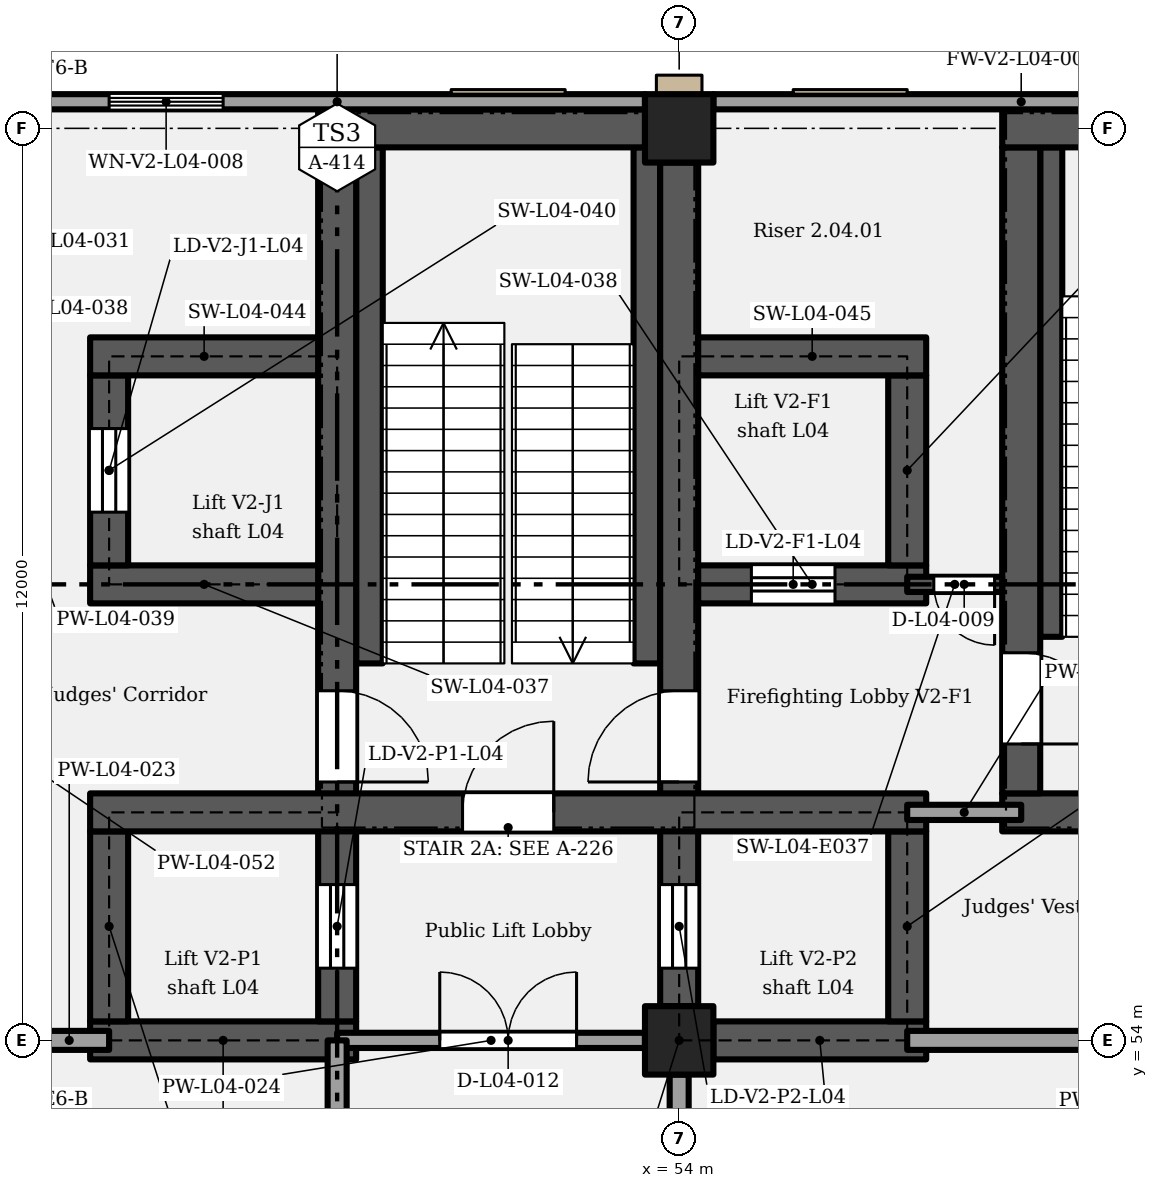
"""IFC4 building model, lengths in metres.
Left out: names, types, materials, properties, quantities, classifications, styles, units other than length and angle.
Written with IfcOpenShell. Run it as: python <this file> out.ifc"""

import sys

from ifc_helpers import new_model, si_unit, direction, frame, frame_2d, origin, origin_2d, place, context, subcontext, project, spatial, rectangle, extrude, element, fill, save


model = new_model("IFC4")
c1 = context("Model", 3, precision=1e-05, world=origin(), true_north=direction((0.0, 1.0)))
c2 = subcontext(c1, "Body", "Model", "MODEL_VIEW")
j1 = project(units=[si_unit("LENGTHUNIT", "METRE"), si_unit("PLANEANGLEUNIT", "RADIAN")], contexts=[c1])
p1 = place(None, origin())
s1 = spatial("IfcSite", under=j1, at=p1, CompositionType="ELEMENT")
p2 = place(p1, origin())
s2 = spatial("IfcBuilding", under=s1, at=p2, CompositionType="ELEMENT")
p3 = place(p2, frame((0.0, 0.0, 22.8)))
s3 = spatial("IfcBuildingStorey", under=s2, at=p3, CompositionType="ELEMENT", Elevation=22.8)
for number, where, z_axis, x_axis in (
    (1, (54.0, 54.0, 0.0), (0.0, 0.0, 1.0), (1.0, 0.0, 0.0)),
    (2, (54.0, 66.0, 0.0), (0.0, 0.0, 1.0), (1.0, 0.0, 0.0)),
):
    element("IfcColumn", number, at=place(p3, frame(where, z_axis=z_axis, x_axis=x_axis)), inside=s3, PredefinedType="COLUMN", context=c2, shape_type="SweptSolid", body=[
        extrude(rectangle(XDim=0.9, YDim=0.9, at=origin_2d()), origin(), (0.0, 0.0, 1.0), 5.4),
    ])
p4 = place(p3, frame((46.25, 54.0, 0.0), z_axis=(0.0, 0.0, 1.0), x_axis=(1.0, 0.0, 0.0)))
e3 = element("IfcWall", 3, at=p4, inside=s3, PredefinedType="SHEAR", context=c2, shape_type="SweptSolid", body=[
    extrude(rectangle(XDim=3.5, YDim=0.5, at=frame_2d((1.75, 0.0))), origin(), (0.0, 0.0, 1.0), 5.15),
])
p5 = place(p3, frame((54.45, 54.0, 0.0), z_axis=(0.0, 0.0, 1.0), x_axis=(1.0, 0.0, 0.0)))
e4 = element("IfcWall", 4, at=p5, inside=s3, PredefinedType="SHEAR", context=c2, shape_type="SweptSolid", body=[
    extrude(rectangle(XDim=2.8, YDim=0.5, at=frame_2d((1.4, 0.0))), origin(), (0.0, 0.0, 1.0), 5.15),
])
p6 = place(p3, frame((46.5, 54.25, 0.0), z_axis=(0.0, 0.0, 1.0), x_axis=(0.0, 1.0, 0.0)))
e5 = element("IfcWall", 5, at=p6, inside=s3, PredefinedType="SHEAR", context=c2, shape_type="SweptSolid", body=[
    extrude(rectangle(XDim=2.5, YDim=0.5, at=frame_2d((1.25, 0.0))), origin(), (0.0, 0.0, 1.0), 5.15),
])
p7 = place(p3, frame((49.5, 54.25, 0.0), z_axis=(0.0, 0.0, 1.0), x_axis=(0.0, 1.0, 0.0)))
e6 = element("IfcWall", 6, at=p7, inside=s3, PredefinedType="SHEAR", context=c2, shape_type="SweptSolid", body=[
    extrude(rectangle(XDim=11.5, YDim=0.5, at=frame_2d((5.75, 0.0))), origin(), (0.0, 0.0, 1.0), 5.15),
])
p8 = place(p7, frame((0.7, 0.0, 0.0)))
e7 = element("IfcOpeningElement", 7, at=p8, cuts=e6, PredefinedType="OPENING", context=c2, shape_type="SweptSolid", body=[
    extrude(rectangle(XDim=1.1, YDim=2.1, at=frame_2d((0.55, 1.05))), frame((0.0, 0.26, 0.0), z_axis=(0.0, -1.0, 0.0), x_axis=(1.0, 0.0, 0.0)), (0.0, 0.0, 1.0), 0.52),
])
p9 = place(p7, frame((4.35, 0.0, 0.0), z_axis=(0.0, 0.0, 1.0), x_axis=(-1.0, 0.0, 0.0)))
e8 = element("IfcOpeningElement", 8, at=p9, cuts=e6, PredefinedType="OPENING", context=c2, shape_type="SweptSolid", body=[
    extrude(rectangle(XDim=1.2, YDim=2.1, at=frame_2d((0.6, 1.05))), frame((0.0, 0.26, 0.0), z_axis=(0.0, -1.0, 0.0), x_axis=(1.0, 0.0, 0.0)), (0.0, 0.0, 1.0), 0.52),
])
p10 = place(p3, frame((57.0, 54.25, 0.0), z_axis=(0.0, 0.0, 1.0), x_axis=(0.0, 1.0, 0.0)))
e9 = element("IfcWall", 9, at=p10, inside=s3, PredefinedType="SHEAR", context=c2, shape_type="SweptSolid", body=[
    extrude(rectangle(XDim=2.5, YDim=0.5, at=frame_2d((1.25, 0.0))), origin(), (0.0, 0.0, 1.0), 5.15),
])
p11 = place(p3, frame((54.0, 54.45, 0.0), z_axis=(0.0, 0.0, 1.0), x_axis=(0.0, 1.0, 0.0)))
e10 = element("IfcWall", 10, at=p11, inside=s3, PredefinedType="SHEAR", context=c2, shape_type="SweptSolid", body=[
    extrude(rectangle(XDim=11.1, YDim=0.5, at=frame_2d((5.55, 0.0))), origin(), (0.0, 0.0, 1.0), 5.15),
])
p12 = place(p11, frame((0.5, 0.0, 0.0)))
e11 = element("IfcOpeningElement", 11, at=p12, cuts=e10, PredefinedType="OPENING", context=c2, shape_type="SweptSolid", body=[
    extrude(rectangle(XDim=1.1, YDim=2.1, at=frame_2d((0.55, 1.05))), frame((0.0, 0.26, 0.0), z_axis=(0.0, -1.0, 0.0), x_axis=(1.0, 0.0, 0.0)), (0.0, 0.0, 1.0), 0.52),
])
p13 = place(p11, frame((2.95, 0.0, 0.0)))
e12 = element("IfcOpeningElement", 12, at=p13, cuts=e10, PredefinedType="OPENING", context=c2, shape_type="SweptSolid", body=[
    extrude(rectangle(XDim=1.2, YDim=2.1, at=frame_2d((0.6, 1.05))), frame((0.0, 0.26, 0.0), z_axis=(0.0, -1.0, 0.0), x_axis=(1.0, 0.0, 0.0)), (0.0, 0.0, 1.0), 0.52),
])
p14 = place(p3, frame((46.25, 57.0, 0.0), z_axis=(0.0, 0.0, 1.0), x_axis=(1.0, 0.0, 0.0)))
e13 = element("IfcWall", 13, at=p14, inside=s3, PredefinedType="SHEAR", context=c2, shape_type="SweptSolid", body=[
    extrude(rectangle(XDim=11.0, YDim=0.5, at=frame_2d((5.5, 0.0))), origin(), (0.0, 0.0, 1.0), 5.15),
])
p15 = place(p14, frame((4.9, 0.0, 0.0)))
e14 = element("IfcOpeningElement", 14, at=p15, cuts=e13, PredefinedType="OPENING", context=c2, shape_type="SweptSolid", body=[
    extrude(rectangle(XDim=1.2, YDim=2.1, at=frame_2d((0.6, 1.05))), frame((0.0, 0.26, 0.0), z_axis=(0.0, -1.0, 0.0), x_axis=(1.0, 0.0, 0.0)), (0.0, 0.0, 1.0), 0.52),
])
p16 = place(p3, frame((58.25, 57.0, 0.0), z_axis=(0.0, 0.0, 1.0), x_axis=(1.0, 0.0, 0.0)))
e15 = element("IfcWall", 15, at=p16, inside=s3, PredefinedType="SHEAR", context=c2, shape_type="SweptSolid", body=[
    extrude(rectangle(XDim=5.0, YDim=0.5, at=frame_2d((2.5, 0.0))), origin(), (0.0, 0.0, 1.0), 5.15),
])
p17 = place(p16, frame((2.0, 0.0, 0.0)))
e16 = element("IfcOpeningElement", 16, at=p17, cuts=e15, PredefinedType="OPENING", context=c2, shape_type="SweptSolid", body=[
    extrude(rectangle(XDim=1.0, YDim=2.1, at=frame_2d((0.5, 1.05))), frame((0.0, 0.26, 0.0), z_axis=(0.0, -1.0, 0.0), x_axis=(1.0, 0.0, 0.0)), (0.0, 0.0, 1.0), 0.52),
])
p18 = place(p3, frame((58.5, 57.25, 0.0), z_axis=(0.0, 0.0, 1.0), x_axis=(0.0, 1.0, 0.0)))
e17 = element("IfcWall", 17, at=p18, inside=s3, PredefinedType="SHEAR", context=c2, shape_type="SweptSolid", body=[
    extrude(rectangle(XDim=8.5, YDim=0.5, at=frame_2d((4.25, 0.0))), origin(), (0.0, 0.0, 1.0), 5.15),
])
p19 = place(p18, frame((1.85, 0.0, 0.0), z_axis=(0.0, 0.0, 1.0), x_axis=(-1.0, 0.0, 0.0)))
e18 = element("IfcOpeningElement", 18, at=p19, cuts=e17, PredefinedType="OPENING", context=c2, shape_type="SweptSolid", body=[
    extrude(rectangle(XDim=1.2, YDim=2.1, at=frame_2d((0.6, 1.05))), frame((0.0, 0.26, 0.0), z_axis=(0.0, -1.0, 0.0), x_axis=(1.0, 0.0, 0.0)), (0.0, 0.0, 1.0), 0.52),
])
p20 = place(p3, frame((46.25, 60.0, 0.0), z_axis=(0.0, 0.0, 1.0), x_axis=(1.0, 0.0, 0.0)))
e19 = element("IfcWall", 19, at=p20, inside=s3, PredefinedType="SHEAR", context=c2, shape_type="SweptSolid", body=[
    extrude(rectangle(XDim=3.0, YDim=0.5, at=frame_2d((1.5, 0.0))), origin(), (0.0, 0.0, 1.0), 5.15),
])
p21 = place(p3, frame((54.25, 60.0, 0.0), z_axis=(0.0, 0.0, 1.0), x_axis=(1.0, 0.0, 0.0)))
e20 = element("IfcWall", 20, at=p21, inside=s3, PredefinedType="SHEAR", context=c2, shape_type="SweptSolid", body=[
    extrude(rectangle(XDim=3.0, YDim=0.5, at=frame_2d((1.5, 0.0))), origin(), (0.0, 0.0, 1.0), 5.15),
])
p22 = place(p21, frame((0.7, 0.0, 0.0)))
e21 = element("IfcOpeningElement", 21, at=p22, cuts=e20, PredefinedType="OPENING", context=c2, shape_type="SweptSolid", body=[
    extrude(rectangle(XDim=1.1, YDim=2.1, at=frame_2d((0.55, 1.05))), frame((0.0, 0.26, 0.0), z_axis=(0.0, -1.0, 0.0), x_axis=(1.0, 0.0, 0.0)), (0.0, 0.0, 1.0), 0.52),
])
p23 = place(p3, frame((46.5, 60.25, 0.0), z_axis=(0.0, 0.0, 1.0), x_axis=(0.0, 1.0, 0.0)))
e22 = element("IfcWall", 22, at=p23, inside=s3, PredefinedType="SHEAR", context=c2, shape_type="SweptSolid", body=[
    extrude(rectangle(XDim=2.5, YDim=0.5, at=frame_2d((1.25, 0.0))), origin(), (0.0, 0.0, 1.0), 5.15),
])
p24 = place(p23, frame((0.7, 0.0, 0.0)))
e23 = element("IfcOpeningElement", 23, at=p24, cuts=e22, PredefinedType="OPENING", context=c2, shape_type="SweptSolid", body=[
    extrude(rectangle(XDim=1.1, YDim=2.1, at=frame_2d((0.55, 1.05))), frame((0.0, 0.26, 0.0), z_axis=(0.0, -1.0, 0.0), x_axis=(1.0, 0.0, 0.0)), (0.0, 0.0, 1.0), 0.52),
])
p25 = place(p3, frame((57.0, 60.25, 0.0), z_axis=(0.0, 0.0, 1.0), x_axis=(0.0, 1.0, 0.0)))
e24 = element("IfcWall", 24, at=p25, inside=s3, PredefinedType="SHEAR", context=c2, shape_type="SweptSolid", body=[
    extrude(rectangle(XDim=2.5, YDim=0.5, at=frame_2d((1.25, 0.0))), origin(), (0.0, 0.0, 1.0), 5.15),
])
for number, where, z_axis, x_axis in (
    (25, (46.25, 63.0, 0.0), (0.0, 0.0, 1.0), (1.0, 0.0, 0.0)),
    (26, (54.25, 63.0, 0.0), (0.0, 0.0, 1.0), (1.0, 0.0, 0.0)),
):
    element("IfcWall", number, at=place(p3, frame(where, z_axis=z_axis, x_axis=x_axis)), inside=s3, PredefinedType="SHEAR", context=c2, shape_type="SweptSolid", body=[
        extrude(rectangle(XDim=3.0, YDim=0.5, at=frame_2d((1.5, 0.0))), origin(), (0.0, 0.0, 1.0), 5.15),
    ])
for number, where, z_axis, x_axis in (
    (27, (49.25, 66.0, 0.0), (0.0, 0.0, 1.0), (1.0, 0.0, 0.0)),
    (28, (58.25, 66.0, 0.0), (0.0, 0.0, 1.0), (1.0, 0.0, 0.0)),
):
    element("IfcWall", number, at=place(p3, frame(where, z_axis=z_axis, x_axis=x_axis)), inside=s3, PredefinedType="SHEAR", context=c2, shape_type="SweptSolid", body=[
        extrude(rectangle(XDim=4.3, YDim=0.5, at=frame_2d((2.15, 0.0))), origin(), (0.0, 0.0, 1.0), 5.15),
    ])
p26 = place(p3, frame((45.45, 66.35, 0.0), z_axis=(0.0, 0.0, 1.0), x_axis=(1.0, 0.0, 0.0)))
e29 = element("IfcWall", 29, at=p26, inside=s3, PredefinedType="SOLIDWALL", context=c2, shape_type="SweptSolid", body=[
    extrude(rectangle(XDim=8.1, YDim=0.2, at=frame_2d((4.05, 0.0))), origin(), (0.0, 0.0, 1.0), 5.15),
])
p27 = place(p26, frame((1.05, 0.0, 1.05)))
e30 = element("IfcOpeningElement", 30, at=p27, cuts=e29, PredefinedType="OPENING", context=c2, shape_type="SweptSolid", body=[
    extrude(rectangle(XDim=1.5, YDim=3.5, at=frame_2d((0.75, 1.75))), frame((0.0, 0.11, 0.0), z_axis=(0.0, -1.0, 0.0), x_axis=(1.0, 0.0, 0.0)), (0.0, 0.0, 1.0), 0.22),
])
p28 = place(p3, frame((54.45, 66.35, 0.0), z_axis=(0.0, 0.0, 1.0), x_axis=(1.0, 0.0, 0.0)))
e31 = element("IfcWall", 31, at=p28, inside=s3, PredefinedType="SOLIDWALL", context=c2, shape_type="SweptSolid", body=[
    extrude(rectangle(XDim=8.1, YDim=0.2, at=frame_2d((4.05, 0.0))), origin(), (0.0, 0.0, 1.0), 5.15),
])
p29 = place(p3, frame((45.45, 54.0, 0.0), z_axis=(0.0, 0.0, 1.0), x_axis=(1.0, 0.0, 0.0)))
e32 = element("IfcWall", 32, at=p29, inside=s3, PredefinedType="PARTITIONING", context=c2, shape_type="SweptSolid", body=[
    extrude(rectangle(XDim=1.05, YDim=0.25, at=frame_2d((0.525, 0.0))), origin(), (0.0, 0.0, 1.0), 4.4),
])
p30 = place(p3, frame((49.5, 54.0, 0.0), z_axis=(0.0, 0.0, 1.0), x_axis=(1.0, 0.0, 0.0)))
e33 = element("IfcWall", 33, at=p30, inside=s3, PredefinedType="PARTITIONING", context=c2, shape_type="SweptSolid", body=[
    extrude(rectangle(XDim=4.05, YDim=0.2, at=frame_2d((2.025, 0.0))), origin(), (0.0, 0.0, 1.0), 4.4),
])
p31 = place(p30, frame((1.35, 0.0, 0.0)))
e34 = element("IfcOpeningElement", 34, at=p31, cuts=e33, PredefinedType="OPENING", context=c2, shape_type="SweptSolid", body=[
    extrude(rectangle(XDim=1.8, YDim=2.1, at=frame_2d((0.9, 1.05))), frame((0.0, 0.11, 0.0), z_axis=(0.0, -1.0, 0.0), x_axis=(1.0, 0.0, 0.0)), (0.0, 0.0, 1.0), 0.22),
])
p32 = place(p3, frame((57.0, 54.0, 0.0), z_axis=(0.0, 0.0, 1.0), x_axis=(1.0, 0.0, 0.0)))
e35 = element("IfcWall", 35, at=p32, inside=s3, PredefinedType="PARTITIONING", context=c2, shape_type="SweptSolid", body=[
    extrude(rectangle(XDim=5.55, YDim=0.25, at=frame_2d((2.775, 0.0))), origin(), (0.0, 0.0, 1.0), 4.4),
])
p33 = place(p32, frame((2.5, 0.0, 0.0)))
e36 = element("IfcOpeningElement", 36, at=p33, cuts=e35, PredefinedType="OPENING", context=c2, shape_type="SweptSolid", body=[
    extrude(rectangle(XDim=1.0, YDim=2.1, at=frame_2d((0.5, 1.05))), frame((0.0, 0.135, 0.0), z_axis=(0.0, -1.0, 0.0), x_axis=(1.0, 0.0, 0.0)), (0.0, 0.0, 1.0), 0.27),
])
p34 = place(p3, frame((57.0, 57.0, 0.0), z_axis=(0.0, 0.0, 1.0), x_axis=(1.0, 0.0, 0.0)))
e37 = element("IfcWall", 37, at=p34, inside=s3, PredefinedType="PARTITIONING", context=c2, shape_type="SweptSolid", body=[
    extrude(rectangle(XDim=1.5, YDim=0.2, at=frame_2d((0.75, 0.0))), origin(), (0.0, 0.0, 1.0), 5.15),
])
p35 = place(p3, frame((57.0, 60.0, 0.0), z_axis=(0.0, 0.0, 1.0), x_axis=(1.0, 0.0, 0.0)))
e38 = element("IfcWall", 38, at=p35, inside=s3, PredefinedType="SHEAR", context=c2, shape_type="SweptSolid", body=[
    extrude(rectangle(XDim=1.25, YDim=0.2, at=frame_2d((0.625, 0.0))), origin(), (0.0, 0.0, 1.0), 5.15),
])
p36 = place(p35, frame((1.15, 0.0, 0.0), z_axis=(0.0, 0.0, 1.0), x_axis=(-1.0, 0.0, 0.0)))
e39 = element("IfcOpeningElement", 39, at=p36, cuts=e38, PredefinedType="OPENING", context=c2, shape_type="SweptSolid", body=[
    extrude(rectangle(XDim=0.8, YDim=2.0, at=frame_2d((0.4, 1.0))), frame((0.0, 0.11, 0.0), z_axis=(0.0, -1.0, 0.0), x_axis=(1.0, 0.0, 0.0)), (0.0, 0.0, 1.0), 0.22),
])
p37 = place(p3, frame((49.5, 43.5, 0.0), z_axis=(0.0, 0.0, 1.0), x_axis=(0.0, 1.0, 0.0)))
e40 = element("IfcWall", 40, at=p37, inside=s3, PredefinedType="PARTITIONING", context=c2, shape_type="SweptSolid", body=[
    extrude(rectangle(XDim=10.5, YDim=0.25, at=frame_2d((5.25, 0.0))), origin(), (0.0, 0.0, 1.0), 5.15),
])
p38 = place(p37, frame((0.6, 0.0, 0.0)))
e41 = element("IfcOpeningElement", 41, at=p38, cuts=e40, PredefinedType="OPENING", context=c2, shape_type="SweptSolid", body=[
    extrude(rectangle(XDim=1.8, YDim=2.4, at=frame_2d((0.9, 1.2))), frame((0.0, 0.135, 0.0), z_axis=(0.0, -1.0, 0.0), x_axis=(1.0, 0.0, 0.0)), (0.0, 0.0, 1.0), 0.27),
])
p39 = place(p37, frame((7.1, 0.0, 0.0)))
e42 = element("IfcOpeningElement", 42, at=p39, cuts=e40, PredefinedType="OPENING", context=c2, shape_type="SweptSolid", body=[
    extrude(rectangle(XDim=1.8, YDim=2.4, at=frame_2d((0.9, 1.2))), frame((0.0, 0.135, 0.0), z_axis=(0.0, -1.0, 0.0), x_axis=(1.0, 0.0, 0.0)), (0.0, 0.0, 1.0), 0.27),
])
p40 = place(p3, frame((54.0, 43.5, 0.0), z_axis=(0.0, 0.0, 1.0), x_axis=(0.0, 1.0, 0.0)))
e43 = element("IfcWall", 43, at=p40, inside=s3, PredefinedType="PARTITIONING", context=c2, shape_type="SweptSolid", body=[
    extrude(rectangle(XDim=10.05, YDim=0.25, at=frame_2d((5.025, 0.0))), origin(), (0.0, 0.0, 1.0), 4.2),
])
p41 = place(p40, frame((3.0, 0.0, 0.0), z_axis=(0.0, 0.0, 1.0), x_axis=(-1.0, 0.0, 0.0)))
e44 = element("IfcOpeningElement", 44, at=p41, cuts=e43, PredefinedType="OPENING", context=c2, shape_type="SweptSolid", body=[
    extrude(rectangle(XDim=1.8, YDim=2.4, at=frame_2d((0.9, 1.2))), frame((0.0, 0.135, 0.0), z_axis=(0.0, -1.0, 0.0), x_axis=(1.0, 0.0, 0.0)), (0.0, 0.0, 1.0), 0.27),
])
p42 = place(p40, frame((8.9, 0.0, 0.0), z_axis=(0.0, 0.0, 1.0), x_axis=(-1.0, 0.0, 0.0)))
e45 = element("IfcOpeningElement", 45, at=p42, cuts=e43, PredefinedType="OPENING", context=c2, shape_type="SweptSolid", body=[
    extrude(rectangle(XDim=1.8, YDim=2.4, at=frame_2d((0.9, 1.2))), frame((0.0, 0.135, 0.0), z_axis=(0.0, -1.0, 0.0), x_axis=(1.0, 0.0, 0.0)), (0.0, 0.0, 1.0), 0.27),
])
p43 = place(p3, frame((49.925, 58.96, 0.0), z_axis=(0.0, 0.0, 1.0), x_axis=(0.0, 1.0, 0.0)))
e46 = element("IfcWall", 46, at=p43, inside=s3, PredefinedType="SHEAR", context=c2, shape_type="SweptSolid", body=[
    extrude(rectangle(XDim=6.79, YDim=0.35, at=frame_2d((3.395, 0.0))), origin(), (0.0, 0.0, 1.0), 2.587),
])
p44 = place(p3, frame((53.575, 58.96, 0.0), z_axis=(0.0, 0.0, 1.0), x_axis=(0.0, 1.0, 0.0)))
e47 = element("IfcWall", 47, at=p44, inside=s3, PredefinedType="SHEAR", context=c2, shape_type="SweptSolid", body=[
    extrude(rectangle(XDim=6.79, YDim=0.35, at=frame_2d((3.395, 0.0))), origin(), (0.0, 0.0, 1.0), 5.15),
])
p45 = place(p3, frame((58.895, 59.31, 0.0), z_axis=(0.0, 0.0, 1.0), x_axis=(0.0, 1.0, 0.0)))
e48 = element("IfcWall", 48, at=p45, inside=s3, PredefinedType="SHEAR", context=c2, shape_type="SweptSolid", body=[
    extrude(rectangle(XDim=6.44, YDim=0.29, at=frame_2d((3.22, 0.0))), origin(), (0.0, 0.0, 1.0), 2.587),
])
p46 = place(p27, origin())
e49 = element("IfcWindow", 49, at=p46, inside=s3, PartitioningType="SINGLE_PANEL", PredefinedType="WINDOW", context=c2, shape_type="SweptSolid", body=[
    extrude(rectangle(XDim=1.5, YDim=3.5, at=frame_2d((0.75, 1.75))), frame((0.0, 0.03, 0.0), z_axis=(0.0, -1.0, 0.0), x_axis=(1.0, 0.0, 0.0)), (0.0, 0.0, 1.0), 0.06),
])
fill(e30, e49)
p47 = place(p8, origin())
e50 = element("IfcDoor", 50, at=p47, inside=s3, OperationType="SLIDING_TO_LEFT", PredefinedType="DOOR", context=c2, shape_type="SweptSolid", body=[
    extrude(rectangle(XDim=1.1, YDim=2.1, at=frame_2d((0.55, 1.05))), frame((0.0, 0.025, 0.0), z_axis=(0.0, -1.0, 0.0), x_axis=(1.0, 0.0, 0.0)), (0.0, 0.0, 1.0), 0.05),
])
fill(e7, e50)
p48 = place(p12, origin())
e51 = element("IfcDoor", 51, at=p48, inside=s3, OperationType="SLIDING_TO_LEFT", PredefinedType="DOOR", context=c2, shape_type="SweptSolid", body=[
    extrude(rectangle(XDim=1.1, YDim=2.1, at=frame_2d((0.55, 1.05))), frame((0.0, 0.025, 0.0), z_axis=(0.0, -1.0, 0.0), x_axis=(1.0, 0.0, 0.0)), (0.0, 0.0, 1.0), 0.05),
])
fill(e11, e51)
p49 = place(p15, origin())
e52 = element("IfcDoor", 52, at=p49, inside=s3, OperationType="SINGLE_SWING_RIGHT", PredefinedType="DOOR", context=c2, shape_type="SweptSolid", body=[
    extrude(rectangle(XDim=1.2, YDim=2.1, at=frame_2d((0.6, 1.05))), frame((0.0, 0.025, 0.0), z_axis=(0.0, -1.0, 0.0), x_axis=(1.0, 0.0, 0.0)), (0.0, 0.0, 1.0), 0.05),
])
fill(e14, e52)
p50 = place(p22, origin())
e53 = element("IfcDoor", 53, at=p50, inside=s3, OperationType="SLIDING_TO_LEFT", PredefinedType="DOOR", context=c2, shape_type="SweptSolid", body=[
    extrude(rectangle(XDim=1.1, YDim=2.1, at=frame_2d((0.55, 1.05))), frame((0.0, 0.025, 0.0), z_axis=(0.0, -1.0, 0.0), x_axis=(1.0, 0.0, 0.0)), (0.0, 0.0, 1.0), 0.05),
])
fill(e21, e53)
p51 = place(p13, origin())
e54 = element("IfcDoor", 54, at=p51, inside=s3, OperationType="SINGLE_SWING_LEFT", PredefinedType="DOOR", context=c2, shape_type="SweptSolid", body=[
    extrude(rectangle(XDim=1.2, YDim=2.1, at=frame_2d((0.6, 1.05))), frame((0.0, 0.025, 0.0), z_axis=(0.0, -1.0, 0.0), x_axis=(1.0, 0.0, 0.0)), (0.0, 0.0, 1.0), 0.05),
])
fill(e12, e54)
p52 = place(p19, origin())
e55 = element("IfcDoor", 55, at=p52, inside=s3, OperationType="SINGLE_SWING_RIGHT", PredefinedType="DOOR", context=c2, shape_type="SweptSolid", body=[
    extrude(rectangle(XDim=1.2, YDim=2.1, at=frame_2d((0.6, 1.05))), frame((0.0, 0.025, 0.0), z_axis=(0.0, -1.0, 0.0), x_axis=(1.0, 0.0, 0.0)), (0.0, 0.0, 1.0), 0.05),
])
fill(e18, e55)
p53 = place(p36, origin())
e56 = element("IfcDoor", 56, at=p53, inside=s3, OperationType="SINGLE_SWING_LEFT", PredefinedType="DOOR", context=c2, shape_type="SweptSolid", body=[
    extrude(rectangle(XDim=0.8, YDim=2.0, at=frame_2d((0.4, 1.0))), frame((0.0, 0.025, 0.0), z_axis=(0.0, -1.0, 0.0), x_axis=(1.0, 0.0, 0.0)), (0.0, 0.0, 1.0), 0.05),
])
fill(e39, e56)
p54 = place(p24, origin())
e57 = element("IfcDoor", 57, at=p54, inside=s3, OperationType="SLIDING_TO_LEFT", PredefinedType="DOOR", context=c2, shape_type="SweptSolid", body=[
    extrude(rectangle(XDim=1.1, YDim=2.1, at=frame_2d((0.55, 1.05))), frame((0.0, 0.025, 0.0), z_axis=(0.0, -1.0, 0.0), x_axis=(1.0, 0.0, 0.0)), (0.0, 0.0, 1.0), 0.05),
])
fill(e23, e57)
p55 = place(p9, origin())
e58 = element("IfcDoor", 58, at=p55, inside=s3, OperationType="SINGLE_SWING_RIGHT", PredefinedType="DOOR", context=c2, shape_type="SweptSolid", body=[
    extrude(rectangle(XDim=1.2, YDim=2.1, at=frame_2d((0.6, 1.05))), frame((0.0, 0.025, 0.0), z_axis=(0.0, -1.0, 0.0), x_axis=(1.0, 0.0, 0.0)), (0.0, 0.0, 1.0), 0.05),
])
fill(e8, e58)
p56 = place(p31, origin())
e59 = element("IfcDoor", 59, at=p56, inside=s3, OperationType="DOUBLE_DOOR_SINGLE_SWING", PredefinedType="DOOR", context=c2, shape_type="SweptSolid", body=[
    extrude(rectangle(XDim=1.8, YDim=2.1, at=frame_2d((0.9, 1.05))), frame((0.0, 0.025, 0.0), z_axis=(0.0, -1.0, 0.0), x_axis=(1.0, 0.0, 0.0)), (0.0, 0.0, 1.0), 0.05),
])
fill(e34, e59)
save(model, sys.argv[1])
